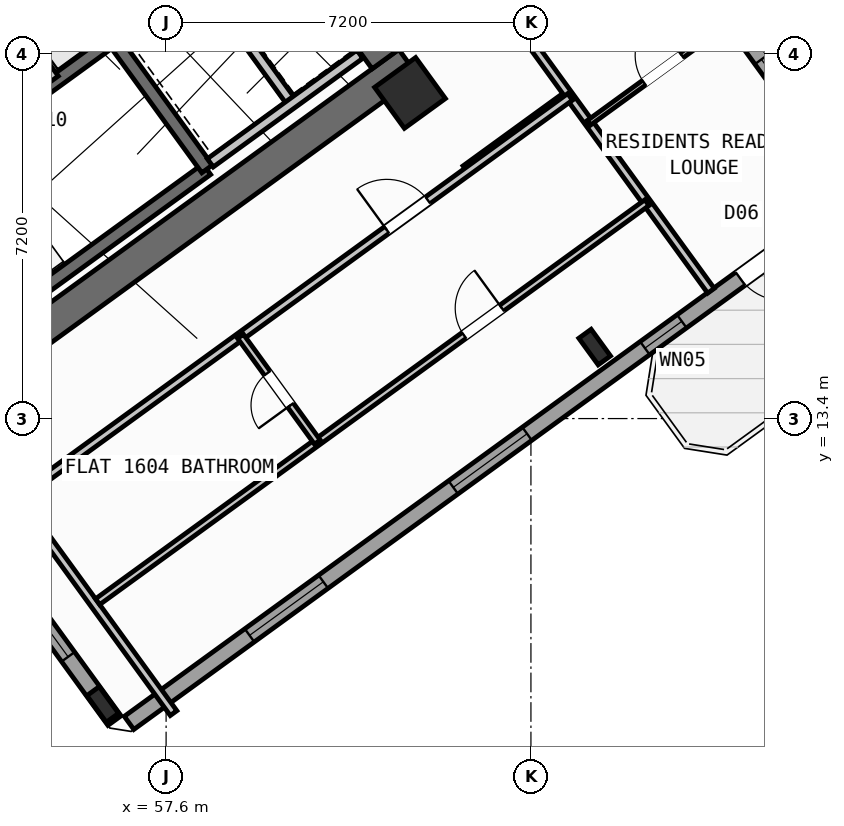
"""IFC4 building model, lengths in metres.
Left out: names, types, materials, properties, quantities, classifications, styles, units other than length and angle.
Written with IfcOpenShell. Run it as: python <this file> out.ifc"""

import sys

from ifc_helpers import new_model, si_unit, direction, frame, frame_2d, origin, origin_2d, place, context, subcontext, project, spatial, rectangle, hollow_rectangle, i_section, extrude, source, transform, mapped, element, fill, save


model = new_model("IFC4")
c1 = context("Model", 3, precision=1e-05, world=origin(), true_north=direction((0.0, 1.0)))
c2 = subcontext(c1, "Body", "Model", "MODEL_VIEW")
j1 = project(units=[si_unit("LENGTHUNIT", "METRE"), si_unit("PLANEANGLEUNIT", "RADIAN")], contexts=[c1])
p1 = place(None, origin())
s1 = spatial("IfcSite", under=j1, at=p1, CompositionType="ELEMENT")
p2 = place(p1, origin())
s2 = spatial("IfcBuilding", under=s1, at=p2, CompositionType="ELEMENT")
p3 = place(p2, frame((0.0, 0.0, 63.6)))
s3 = spatial("IfcBuildingStorey", under=s2, at=p3, CompositionType="ELEMENT", Elevation=63.6)
p4 = place(p3, frame((52.318, 13.11, 0.0), z_axis=(0.0, 0.0, 1.0), x_axis=(0.809019445368, 0.587781878776, 0.0)))
e1 = element("IfcWall", 1, at=p4, inside=s3, PredefinedType="SHEAR", context=c2, shape_type="SweptSolid", body=[
    extrude(rectangle(XDim=12.44, YDim=0.65, at=frame_2d((6.22, 0.0))), origin(), (0.0, 0.0, 1.0), 3.35),
])
p5 = place(p3, frame((61.929, 20.494, 0.0), z_axis=(0.0, 0.0, 1.0), x_axis=(-0.58782982593, 0.808984607855, 0.0)))
e2 = element("IfcWall", 2, at=p5, inside=s3, PredefinedType="SHEAR", context=c2, shape_type="SweptSolid", body=[
    extrude(rectangle(XDim=3.525, YDim=0.65, at=frame_2d((1.762, 0.0))), origin(), (0.0, 0.0, 1.0), 3.35),
])
m1 = source(origin(), c2, "Body", "SweptSolid", [
    extrude(i_section(OverallWidth=0.3, OverallDepth=0.65, WebThickness=0.016, FlangeThickness=0.031, at=origin_2d()), origin(), (0.0, 0.0, 1.0), 3.6),
])
for number, where, z_axis, x_axis in (
    (3, (56.35, 7.758, 0.0), (0.0, 0.0, 1.0), (0.809, 0.588, 0.0)),
    (4, (66.058, 14.811, 0.0), (0.0, 0.0, 1.0), (0.809, 0.588, 0.0)),
):
    element("IfcColumn", number, at=place(p3, frame(where, z_axis=z_axis, x_axis=x_axis)), inside=s3, PredefinedType="COLUMN", context=c2, shape_type="MappedRepresentation", body=[
        mapped(m1, transform((0.0, 0.0, 0.0), scale=1.0)),
    ])
m2 = source(origin(), c2, "Body", "SweptSolid", [
    extrude(hollow_rectangle(XDim=1.0, YDim=1.0, WallThickness=0.04, at=origin_2d()), origin(), (0.0, 0.0, 1.0), 3.6),
])
p6 = place(p3, frame((62.414, 19.827, 0.0), z_axis=(0.0, 0.0, 1.0), x_axis=(0.809016994375, 0.587785252292, 0.0)))
e5 = element("IfcColumn", 5, at=p6, inside=s3, PredefinedType="COLUMN", context=c2, shape_type="MappedRepresentation", body=[
    mapped(m2, transform((0.0, 0.0, 0.0), scale=1.0)),
])
p7 = place(p3, frame((58.455, 35.484, 0.0), z_axis=(0.0, 0.0, 1.0), x_axis=(0.587783625747, -0.809018176127, 0.0)))
e6 = element("IfcWall", 6, at=p7, inside=s3, PredefinedType="STANDARD", context=c2, shape_type="SweptSolid", body=[
    extrude(rectangle(XDim=21.587, YDim=0.32, at=frame_2d((10.794, 0.0))), origin(), (0.0, 0.0, 1.0), 2.725),
])
p8 = place(p7, frame((2.994, 0.0, 0.8)))
e7 = element("IfcOpeningElement", 7, at=p8, cuts=e6, PredefinedType="OPENING", context=c2, shape_type="SweptSolid", body=[
    extrude(rectangle(XDim=2.1, YDim=1.55, at=frame_2d((1.05, 0.775))), frame((0.0, 0.17, 0.0), z_axis=(0.0, -1.0, 0.0), x_axis=(1.0, 0.0, 0.0)), (0.0, 0.0, 1.0), 0.34),
])
p9 = place(p7, frame((11.934, 0.0, 0.85)))
e8 = element("IfcOpeningElement", 8, at=p9, cuts=e6, PredefinedType="OPENING", context=c2, shape_type="SweptSolid", body=[
    extrude(rectangle(XDim=1.8, YDim=1.5, at=frame_2d((0.9, 0.75))), frame((0.0, 0.17, 0.0), z_axis=(0.0, -1.0, 0.0), x_axis=(1.0, 0.0, 0.0)), (0.0, 0.0, 1.0), 0.34),
])
p10 = place(p7, frame((18.535, 0.0, 0.85)))
e9 = element("IfcOpeningElement", 9, at=p10, cuts=e6, PredefinedType="OPENING", context=c2, shape_type="SweptSolid", body=[
    extrude(rectangle(XDim=1.5, YDim=1.5, at=frame_2d((0.75, 0.75))), frame((0.0, 0.17, 0.0), z_axis=(0.0, -1.0, 0.0), x_axis=(1.0, 0.0, 0.0)), (0.0, 0.0, 1.0), 0.34),
])
p11 = place(p3, frame((71.098, 17.731, 0.0), z_axis=(0.0, 0.0, 1.0), x_axis=(-0.809021120468, -0.587779573171, 0.0)))
e10 = element("IfcWall", 10, at=p11, inside=s3, PredefinedType="STANDARD", context=c2, shape_type="SweptSolid", body=[
    extrude(rectangle(XDim=17.588, YDim=0.32, at=frame_2d((8.794, 0.0))), origin(), (0.0, 0.0, 1.0), 3.35),
])
p12 = place(p11, frame((1.624, 0.0, 0.0)))
e11 = element("IfcOpeningElement", 11, at=p12, cuts=e10, PredefinedType="OPENING", context=c2, shape_type="SweptSolid", body=[
    extrude(rectangle(XDim=1.05, YDim=2.15, at=frame_2d((0.525, 1.075))), frame((0.0, 0.17, 0.0), z_axis=(0.0, -1.0, 0.0), x_axis=(1.0, 0.0, 0.0)), (0.0, 0.0, 1.0), 0.34),
])
p13 = place(p11, frame((4.104, 0.0, 1.0)))
e12 = element("IfcOpeningElement", 12, at=p13, cuts=e10, PredefinedType="OPENING", context=c2, shape_type="SweptSolid", body=[
    extrude(rectangle(XDim=0.9, YDim=1.25, at=frame_2d((0.45, 0.625))), frame((0.0, 0.17, 0.0), z_axis=(0.0, -1.0, 0.0), x_axis=(1.0, 0.0, 0.0)), (0.0, 0.0, 1.0), 0.34),
])
p14 = place(p11, frame((7.879, 0.0, 0.85)))
e13 = element("IfcOpeningElement", 13, at=p14, cuts=e10, PredefinedType="OPENING", context=c2, shape_type="SweptSolid", body=[
    extrude(rectangle(XDim=1.8, YDim=1.5, at=frame_2d((0.9, 0.75))), frame((0.0, 0.17, 0.0), z_axis=(0.0, -1.0, 0.0), x_axis=(1.0, 0.0, 0.0)), (0.0, 0.0, 1.0), 0.34),
])
p15 = place(p11, frame((12.849, 0.0, 0.85)))
e14 = element("IfcOpeningElement", 14, at=p15, cuts=e10, PredefinedType="OPENING", context=c2, shape_type="SweptSolid", body=[
    extrude(rectangle(XDim=1.8, YDim=1.5, at=frame_2d((0.9, 0.75))), frame((0.0, 0.17, 0.0), z_axis=(0.0, -1.0, 0.0), x_axis=(1.0, 0.0, 0.0)), (0.0, 0.0, 1.0), 0.34),
])
p16 = place(p3, frame((56.581, 7.439, 0.0), z_axis=(0.0, 0.0, 1.0), x_axis=(-0.587785875463, 0.809016541614, 0.0)))
e15 = element("IfcWall", 15, at=p16, inside=s3, PredefinedType="STANDARD", context=c2, shape_type="SweptSolid", body=[
    extrude(rectangle(XDim=6.774, YDim=0.32, at=frame_2d((3.387, 0.0))), origin(), (0.0, 0.0, 1.0), 2.725),
])
p17 = place(p16, frame((1.556, 0.0, 0.8)))
e16 = element("IfcOpeningElement", 16, at=p17, cuts=e15, PredefinedType="OPENING", context=c2, shape_type="SweptSolid", body=[
    extrude(rectangle(XDim=2.1, YDim=1.55, at=frame_2d((1.05, 0.775))), frame((0.0, 0.17, 0.0), z_axis=(0.0, -1.0, 0.0), x_axis=(1.0, 0.0, 0.0)), (0.0, 0.0, 1.0), 0.34),
])
p18 = place(p3, frame((52.472, 14.013, 0.0), z_axis=(0.0, 0.0, 1.0), x_axis=(0.809028366311, 0.587769599847, 0.0)))
e17 = element("IfcWall", 17, at=p18, inside=s3, PredefinedType="SHEAR", context=c2, shape_type="SweptSolid", body=[
    extrude(rectangle(XDim=7.33, YDim=0.26, at=frame_2d((3.665, 0.0))), origin(), (0.0, 0.0, 1.0), 3.35),
])
p19 = place(p3, frame((50.615, 16.57, 0.0), z_axis=(0.0, 0.0, 1.0), x_axis=(0.809028366311, 0.587769599847, 0.0)))
e18 = element("IfcWall", 18, at=p19, inside=s3, PredefinedType="SHEAR", context=c2, shape_type="SweptSolid", body=[
    extrude(rectangle(XDim=7.33, YDim=0.26, at=frame_2d((3.665, 0.0))), origin(), (0.0, 0.0, 1.0), 3.35),
])
p20 = place(p19, frame((0.22, 0.0, 0.0)))
e19 = element("IfcOpeningElement", 19, at=p20, cuts=e18, PredefinedType="OPENING", context=c2, shape_type="SweptSolid", body=[
    extrude(rectangle(XDim=1.1, YDim=2.1, at=frame_2d((0.55, 1.05))), frame((0.0, 0.14, 0.0), z_axis=(0.0, -1.0, 0.0), x_axis=(1.0, 0.0, 0.0)), (0.0, 0.0, 1.0), 0.28),
])
p21 = place(p3, frame((58.41, 18.327, 0.0), z_axis=(0.0, 0.0, 1.0), x_axis=(-0.58776738483, 0.809029975545, 0.0)))
e20 = element("IfcWall", 20, at=p21, inside=s3, PredefinedType="SHEAR", context=c2, shape_type="SweptSolid", body=[
    extrude(rectangle(XDim=3.16, YDim=0.26, at=frame_2d((1.58, 0.0))), origin(), (0.0, 0.0, 1.0), 3.35),
])
p22 = place(p3, frame((55.391, 20.102, 0.0), z_axis=(0.0, 0.0, 1.0), x_axis=(-0.58778447739, 0.809017557374, 0.0)))
e21 = element("IfcWall", 21, at=p22, inside=s3, PredefinedType="STANDARD", context=c2, shape_type="SweptSolid", body=[
    extrude(rectangle(XDim=1.65, YDim=0.2, at=frame_2d((0.825, 0.0))), origin(), (0.0, 0.0, 1.0), 3.34),
])
p23 = place(p3, frame((60.067, 19.655, 0.0), z_axis=(0.0, 0.0, 1.0), x_axis=(-0.587800520745, 0.809005900975, 0.0)))
e22 = element("IfcWall", 22, at=p23, inside=s3, PredefinedType="STANDARD", context=c2, shape_type="SweptSolid", body=[
    extrude(rectangle(XDim=2.66, YDim=0.2, at=frame_2d((1.33, 0.0))), origin(), (0.0, 0.0, 1.0), 3.34),
])
p24 = place(p3, frame((58.472, 18.447, 0.0), z_axis=(0.0, 0.0, 1.0), x_axis=(0.809022487728, 0.587777691266, 0.0)))
e23 = element("IfcWall", 23, at=p24, inside=s3, PredefinedType="STANDARD", context=c2, shape_type="SweptSolid", body=[
    extrude(rectangle(XDim=3.648, YDim=0.2, at=frame_2d((1.824, 0.0))), origin(), (0.0, 0.0, 1.0), 3.34),
])
p25 = place(p3, frame((63.507, 18.322, 0.0), z_axis=(0.0, 0.0, 1.0), x_axis=(0.809034604122, 0.587761013791, 0.0)))
e24 = element("IfcWall", 24, at=p25, inside=s3, PredefinedType="PARTITIONING", context=c2, shape_type="SweptSolid", body=[
    extrude(rectangle(XDim=2.51, YDim=0.16, at=frame_2d((1.255, 0.0))), origin(), (0.0, 0.0, 1.0), 3.34),
])
p26 = place(p3, frame((68.353, 15.922, 0.0), z_axis=(0.0, 0.0, 1.0), x_axis=(-0.587783168305, 0.809018508476, 0.0)))
e25 = element("IfcWall", 25, at=p26, inside=s3, PredefinedType="PARTITIONING", context=c2, shape_type="SweptSolid", body=[
    extrude(rectangle(XDim=10.65, YDim=0.16, at=frame_2d((5.325, 0.0))), origin(), (0.0, 0.0, 1.0), 3.34),
])
p27 = place(p3, frame((65.944, 19.238, 0.0), z_axis=(0.0, 0.0, 1.0), x_axis=(0.809013833588, 0.587789602718, 0.0)))
e26 = element("IfcWall", 26, at=p27, inside=s3, PredefinedType="PARTITIONING", context=c2, shape_type="SweptSolid", body=[
    extrude(rectangle(XDim=3.61, YDim=0.11, at=frame_2d((1.805, 0.0))), origin(), (0.0, 0.0, 1.0), 3.34),
])
p28 = place(p27, frame((1.345, 0.0, 0.0)))
e27 = element("IfcOpeningElement", 27, at=p28, cuts=e26, PredefinedType="OPENING", context=c2, shape_type="SweptSolid", body=[
    extrude(rectangle(XDim=0.92, YDim=2.08, at=frame_2d((0.46, 1.04))), frame((0.0, 0.065, 0.0), z_axis=(0.0, -1.0, 0.0), x_axis=(1.0, 0.0, 0.0)), (0.0, 0.0, 1.0), 0.13),
])
p29 = place(p3, frame((53.705, 11.126, 0.0), z_axis=(0.0, 0.0, 1.0), x_axis=(0.809014504436, 0.587788679384, 0.0)))
e28 = element("IfcWall", 28, at=p29, inside=s3, PredefinedType="PARTITIONING", context=c2, shape_type="SweptSolid", body=[
    extrude(rectangle(XDim=14.67, YDim=0.16, at=frame_2d((7.335, 0.0))), origin(), (0.0, 0.0, 1.0), 3.34),
])
p30 = place(p29, frame((10.2, 0.0, 0.0)))
e29 = element("IfcOpeningElement", 29, at=p30, cuts=e28, PredefinedType="OPENING", context=c2, shape_type="SweptSolid", body=[
    extrude(rectangle(XDim=1.0, YDim=2.1, at=frame_2d((0.5, 1.05))), frame((0.0, 0.09, 0.0), z_axis=(0.0, -1.0, 0.0), x_axis=(1.0, 0.0, 0.0)), (0.0, 0.0, 1.0), 0.18),
])
p31 = place(p3, frame((57.747, 7.586, 0.0), z_axis=(0.0, 0.0, 1.0), x_axis=(-0.587784893399, 0.809017255126, 0.0)))
e30 = element("IfcWall", 30, at=p31, inside=s3, PredefinedType="PARTITIONING", context=c2, shape_type="SweptSolid", body=[
    extrude(rectangle(XDim=5.48, YDim=0.16, at=frame_2d((2.74, 0.0))), origin(), (0.0, 0.0, 1.0), 3.34),
])
p32 = place(p3, frame((56.249, 9.785, 0.0), z_axis=(0.0, 0.0, 1.0), x_axis=(0.809011747655, 0.587792473715, 0.0)))
e31 = element("IfcWall", 31, at=p32, inside=s3, PredefinedType="PLUMBINGWALL", context=c2, shape_type="SweptSolid", body=[
    extrude(rectangle(XDim=13.4, YDim=0.14, at=frame_2d((6.7, 0.0))), origin(), (0.0, 0.0, 1.0), 3.34),
])
p33 = place(p32, frame((8.94, 0.0, 0.0)))
e32 = element("IfcOpeningElement", 32, at=p33, cuts=e31, PredefinedType="OPENING", context=c2, shape_type="SweptSolid", body=[
    extrude(rectangle(XDim=0.92, YDim=2.08, at=frame_2d((0.46, 1.04))), frame((0.0, 0.08, 0.0), z_axis=(0.0, -1.0, 0.0), x_axis=(1.0, 0.0, 0.0)), (0.0, 0.0, 1.0), 0.16),
])
p34 = place(p3, frame((60.585, 12.936, 0.0), z_axis=(0.0, 0.0, 1.0), x_axis=(-0.587772116736, 0.809026537752, 0.0)))
e33 = element("IfcWall", 33, at=p34, inside=s3, PredefinedType="PLUMBINGWALL", context=c2, shape_type="SweptSolid", body=[
    extrude(rectangle(XDim=2.58, YDim=0.14, at=frame_2d((1.29, 0.0))), origin(), (0.0, 0.0, 1.0), 3.34),
])
p35 = place(p34, frame((0.9, 0.0, 0.0)))
e34 = element("IfcOpeningElement", 34, at=p35, cuts=e33, PredefinedType="OPENING", context=c2, shape_type="SweptSolid", body=[
    extrude(rectangle(XDim=0.78, YDim=2.05, at=frame_2d((0.39, 1.025))), frame((0.0, 0.08, 0.0), z_axis=(0.0, -1.0, 0.0), x_axis=(1.0, 0.0, 0.0)), (0.0, 0.0, 1.0), 0.16),
])
m3 = source(origin(), c2, "Body", "SweptSolid", [
    extrude(rectangle(XDim=1.05, YDim=2.15, at=frame_2d((0.525, 1.075))), frame((0.0, 0.025, 0.0), z_axis=(0.0, -1.0, 0.0), x_axis=(1.0, 0.0, 0.0)), (0.0, 0.0, 1.0), 0.05),
])
p36 = place(p12, origin())
e35 = element("IfcDoor", 35, at=p36, inside=s3, OperationType="SINGLE_SWING_LEFT", PredefinedType="DOOR", context=c2, shape_type="MappedRepresentation", body=[
    mapped(m3, transform((0.0, 0.0, 0.0), scale=1.0)),
])
fill(e11, e35)
m4 = source(origin(), c2, "Body", "SweptSolid", [
    extrude(rectangle(XDim=1.5, YDim=1.5, at=frame_2d((0.75, 0.75))), frame((0.0, 0.03, 0.0), z_axis=(0.0, -1.0, 0.0), x_axis=(1.0, 0.0, 0.0)), (0.0, 0.0, 1.0), 0.06),
])
p37 = place(p10, origin())
e36 = element("IfcWindow", 36, at=p37, inside=s3, PartitioningType="SINGLE_PANEL", PredefinedType="WINDOW", context=c2, shape_type="MappedRepresentation", body=[
    mapped(m4, transform((0.0, 0.0, 0.0), scale=1.0)),
])
fill(e9, e36)
m5 = source(origin(), c2, "Body", "SweptSolid", [
    extrude(rectangle(XDim=0.9, YDim=1.25, at=frame_2d((0.45, 0.625))), frame((0.0, 0.03, 0.0), z_axis=(0.0, -1.0, 0.0), x_axis=(1.0, 0.0, 0.0)), (0.0, 0.0, 1.0), 0.06),
])
p38 = place(p13, origin())
e37 = element("IfcWindow", 37, at=p38, inside=s3, PartitioningType="SINGLE_PANEL", PredefinedType="WINDOW", context=c2, shape_type="MappedRepresentation", body=[
    mapped(m5, transform((0.0, 0.0, 0.0), scale=1.0)),
])
fill(e12, e37)
m6 = source(origin(), c2, "Body", "SweptSolid", [
    extrude(rectangle(XDim=1.8, YDim=1.5, at=frame_2d((0.9, 0.75))), frame((0.0, 0.03, 0.0), z_axis=(0.0, -1.0, 0.0), x_axis=(1.0, 0.0, 0.0)), (0.0, 0.0, 1.0), 0.06),
])
p39 = place(p14, origin())
e38 = element("IfcWindow", 38, at=p39, inside=s3, PartitioningType="SINGLE_PANEL", PredefinedType="WINDOW", context=c2, shape_type="MappedRepresentation", body=[
    mapped(m6, transform((0.0, 0.0, 0.0), scale=1.0)),
])
fill(e13, e38)
p40 = place(p15, origin())
e39 = element("IfcWindow", 39, at=p40, inside=s3, PartitioningType="SINGLE_PANEL", PredefinedType="WINDOW", context=c2, shape_type="MappedRepresentation", body=[
    mapped(m6, transform((0.0, 0.0, 0.0), scale=1.0)),
])
fill(e14, e39)
m7 = source(origin(), c2, "Body", "SweptSolid", [
    extrude(rectangle(XDim=2.1, YDim=1.55, at=frame_2d((1.05, 0.775))), frame((0.0, 0.03, 0.0), z_axis=(0.0, -1.0, 0.0), x_axis=(1.0, 0.0, 0.0)), (0.0, 0.0, 1.0), 0.06),
])
p41 = place(p17, origin())
e40 = element("IfcWindow", 40, at=p41, inside=s3, PartitioningType="SINGLE_PANEL", PredefinedType="WINDOW", context=c2, shape_type="MappedRepresentation", body=[
    mapped(m7, transform((0.0, 0.0, 0.0), scale=1.0)),
])
fill(e16, e40)
m8 = source(origin(), c2, "Body", "SweptSolid", [
    extrude(rectangle(XDim=0.92, YDim=2.08, at=frame_2d((0.46, 1.04))), frame((0.0, 0.025, 0.0), z_axis=(0.0, -1.0, 0.0), x_axis=(1.0, 0.0, 0.0)), (0.0, 0.0, 1.0), 0.05),
])
p42 = place(p28, origin())
e41 = element("IfcDoor", 41, at=p42, inside=s3, OperationType="SINGLE_SWING_RIGHT", PredefinedType="DOOR", context=c2, shape_type="MappedRepresentation", body=[
    mapped(m8, transform((0.0, 0.0, 0.0), scale=1.0)),
])
fill(e27, e41)
m9 = source(origin(), c2, "Body", "SweptSolid", [
    extrude(rectangle(XDim=1.0, YDim=2.1, at=frame_2d((0.5, 1.05))), frame((0.0, 0.025, 0.0), z_axis=(0.0, -1.0, 0.0), x_axis=(1.0, 0.0, 0.0)), (0.0, 0.0, 1.0), 0.05),
])
p43 = place(p30, origin())
e42 = element("IfcDoor", 42, at=p43, inside=s3, OperationType="SINGLE_SWING_LEFT", PredefinedType="DOOR", context=c2, shape_type="MappedRepresentation", body=[
    mapped(m9, transform((0.0, 0.0, 0.0), scale=1.0)),
])
fill(e29, e42)
p44 = place(p33, origin())
e43 = element("IfcDoor", 43, at=p44, inside=s3, OperationType="SINGLE_SWING_RIGHT", PredefinedType="DOOR", context=c2, shape_type="MappedRepresentation", body=[
    mapped(m8, transform((0.0, 0.0, 0.0), scale=1.0)),
])
fill(e32, e43)
m10 = source(origin(), c2, "Body", "SweptSolid", [
    extrude(rectangle(XDim=0.78, YDim=2.05, at=frame_2d((0.39, 1.025))), frame((0.0, 0.025, 0.0), z_axis=(0.0, -1.0, 0.0), x_axis=(1.0, 0.0, 0.0)), (0.0, 0.0, 1.0), 0.05),
])
p45 = place(p35, origin())
e44 = element("IfcDoor", 44, at=p45, inside=s3, OperationType="SINGLE_SWING_LEFT", PredefinedType="DOOR", context=c2, shape_type="MappedRepresentation", body=[
    mapped(m10, transform((0.0, 0.0, 0.0), scale=1.0)),
])
fill(e34, e44)
save(model, sys.argv[1])
